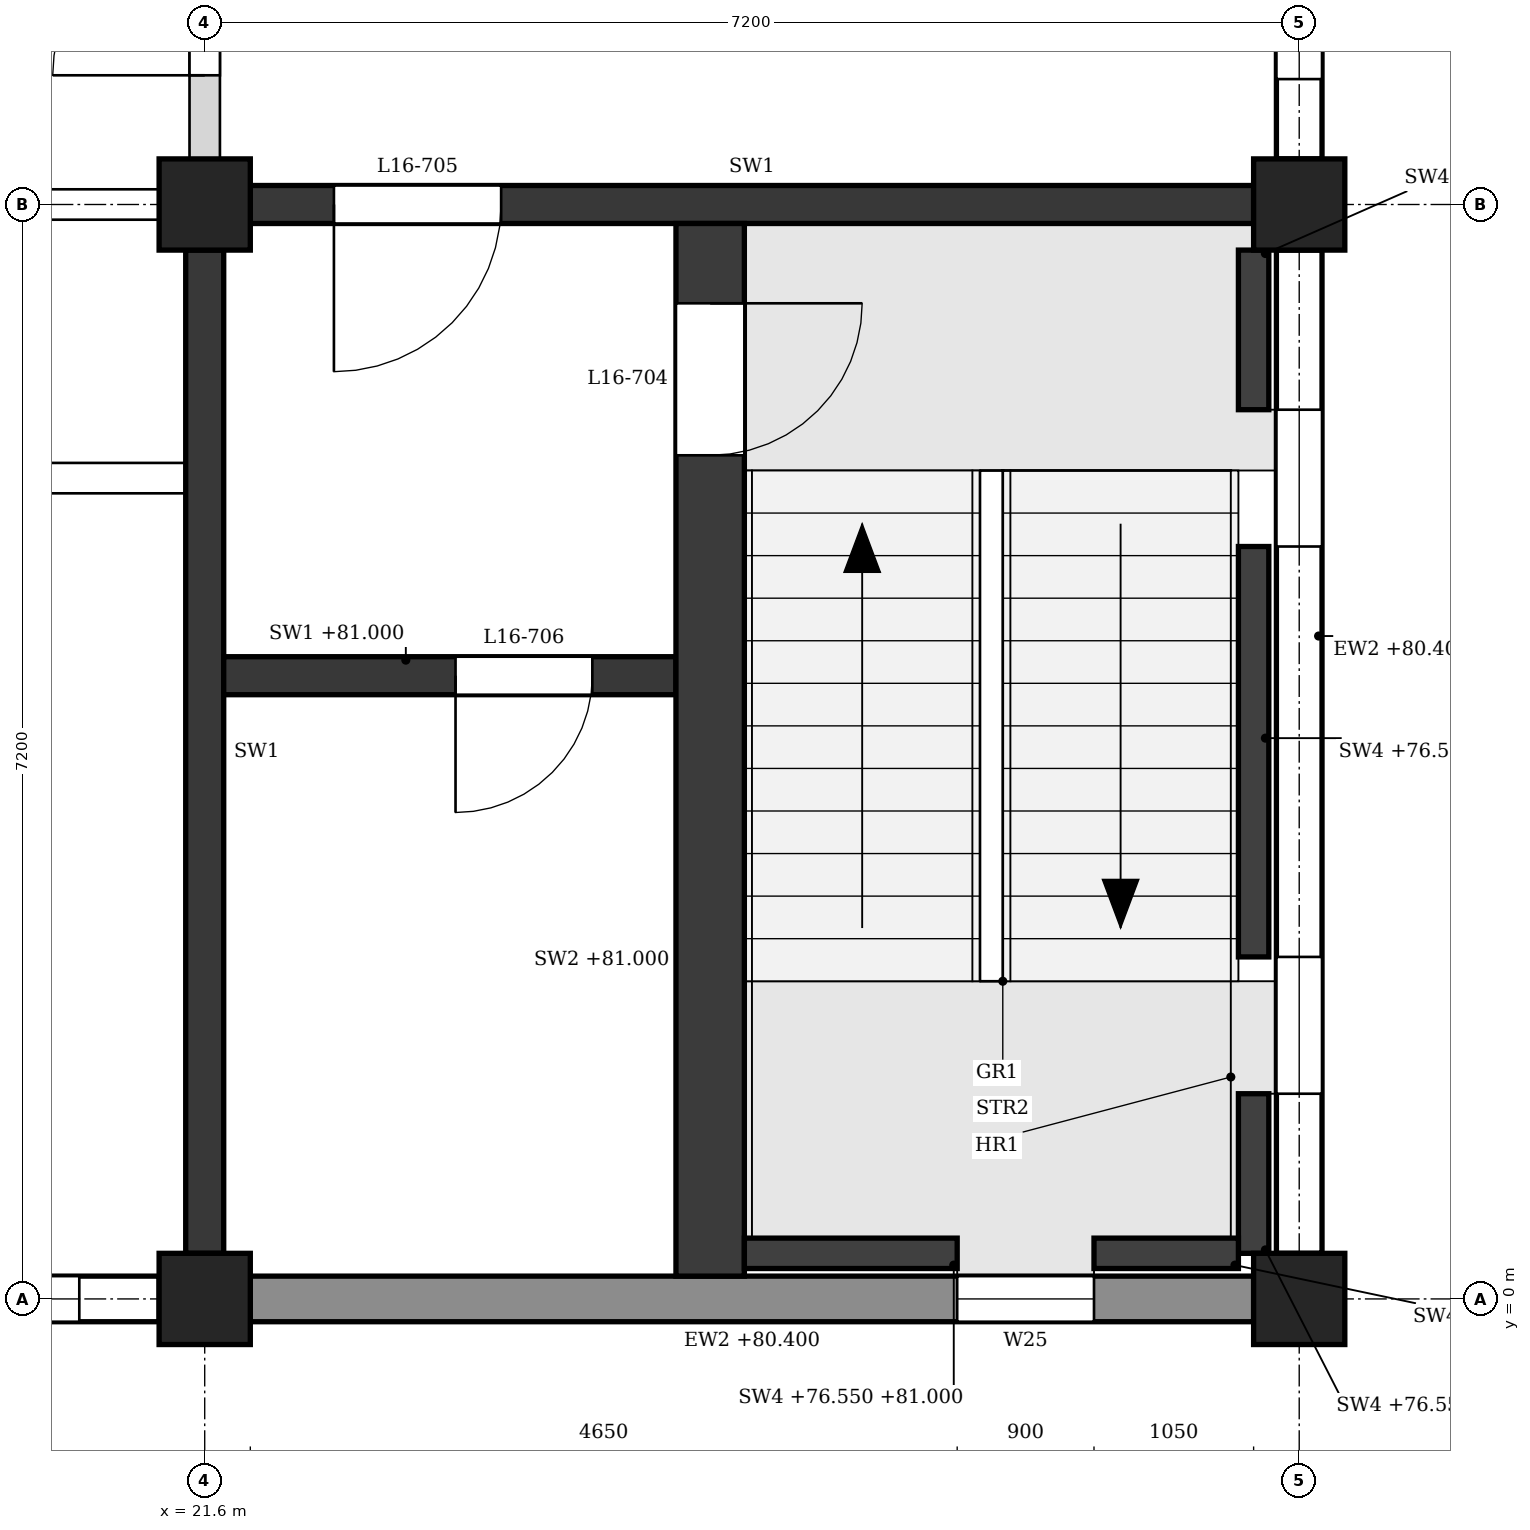
"""IFC4 building model, lengths in metres.
Left out: names, types, materials, properties, quantities, classifications, styles, units other than length and angle.
Written with IfcOpenShell. Run it as: python <this file> out.ifc"""

import sys

from ifc_helpers import new_model, si_unit, direction, frame, frame_2d, origin, origin_2d, place, context, subcontext, project, spatial, polyline, rectangle, outline, extrude, element, fill, save


model = new_model("IFC4")
c1 = context("Model", 3, precision=1e-05, world=origin(), true_north=direction((0.0, 1.0)))
c2 = subcontext(c1, "Body", "Model", "MODEL_VIEW")
j1 = project(units=[si_unit("LENGTHUNIT", "METRE"), si_unit("PLANEANGLEUNIT", "RADIAN")], contexts=[c1])
p1 = place(None, origin())
s1 = spatial("IfcSite", under=j1, at=p1, CompositionType="ELEMENT")
p2 = place(p1, origin())
s2 = spatial("IfcBuilding", under=s1, at=p2, CompositionType="ELEMENT")
p3 = place(p2, frame((0.0, 0.0, 76.8)))
s3 = spatial("IfcBuildingStorey", under=s2, at=p3, CompositionType="ELEMENT", Elevation=76.8)
for number, where, z_axis, x_axis in (
    (1, (21.6, 0.0, 0.0), (0.0, 0.0, 1.0), (1.0, 0.0, 0.0)),
    (2, (21.6, 7.2, 0.0), (0.0, 0.0, 1.0), (1.0, 0.0, 0.0)),
    (3, (28.8, 0.0, 0.0), (0.0, 0.0, 1.0), (1.0, 0.0, 0.0)),
    (4, (28.8, 7.2, 0.0), (0.0, 0.0, 1.0), (1.0, 0.0, 0.0)),
):
    element("IfcColumn", number, at=place(p3, frame(where, z_axis=z_axis, x_axis=x_axis)), inside=s3, PredefinedType="COLUMN", context=c2, shape_type="SweptSolid", body=[
        extrude(rectangle(XDim=0.6, YDim=0.6, at=origin_2d()), origin(), (0.0, 0.0, 1.0), 4.5),
    ])
p4 = place(p3, frame((14.7, 0.0, 0.0), z_axis=(0.0, 0.0, 1.0), x_axis=(1.0, 0.0, 0.0)))
e5 = element("IfcWall", 5, at=p4, inside=s3, PredefinedType="STANDARD", context=c2, shape_type="SweptSolid", body=[
    extrude(rectangle(XDim=6.6, YDim=0.3, at=frame_2d((3.3, 0.0))), origin(), (0.0, 0.0, 1.0), 3.6),
])
p5 = place(p4, frame((0.525, 0.0, 0.9)))
e6 = element("IfcOpeningElement", 6, at=p5, cuts=e5, PredefinedType="OPENING", context=c2, shape_type="SweptSolid", body=[
    extrude(outline(polyline([(0.0, 0.0), (0.9, 0.0), (0.9, 2.15), (0.45, 2.6), (0.0, 2.15), (0.0, 0.0)])), frame((0.0, 0.16, 0.0), z_axis=(0.0, -1.0, 0.0), x_axis=(1.0, 0.0, 0.0)), (0.0, 0.0, 1.0), 0.32),
])
p6 = place(p4, frame((1.575, 0.0, 0.9)))
e7 = element("IfcOpeningElement", 7, at=p6, cuts=e5, PredefinedType="OPENING", context=c2, shape_type="SweptSolid", body=[
    extrude(outline(polyline([(0.0, 0.0), (0.9, 0.0), (0.9, 2.15), (0.45, 2.6), (0.0, 2.15), (0.0, 0.0)])), frame((0.0, 0.16, 0.0), z_axis=(0.0, -1.0, 0.0), x_axis=(1.0, 0.0, 0.0)), (0.0, 0.0, 1.0), 0.32),
])
p7 = place(p4, frame((4.125, 0.0, 0.9)))
e8 = element("IfcOpeningElement", 8, at=p7, cuts=e5, PredefinedType="OPENING", context=c2, shape_type="SweptSolid", body=[
    extrude(outline(polyline([(0.0, 0.0), (0.9, 0.0), (0.9, 2.15), (0.45, 2.6), (0.0, 2.15), (0.0, 0.0)])), frame((0.0, 0.16, 0.0), z_axis=(0.0, -1.0, 0.0), x_axis=(1.0, 0.0, 0.0)), (0.0, 0.0, 1.0), 0.32),
])
p8 = place(p4, frame((5.175, 0.0, 0.9)))
e9 = element("IfcOpeningElement", 9, at=p8, cuts=e5, PredefinedType="OPENING", context=c2, shape_type="SweptSolid", body=[
    extrude(outline(polyline([(0.0, 0.0), (0.9, 0.0), (0.9, 2.15), (0.45, 2.6), (0.0, 2.15), (0.0, 0.0)])), frame((0.0, 0.16, 0.0), z_axis=(0.0, -1.0, 0.0), x_axis=(1.0, 0.0, 0.0)), (0.0, 0.0, 1.0), 0.32),
])
p9 = place(p3, frame((21.9, 0.0, 0.0), z_axis=(0.0, 0.0, 1.0), x_axis=(1.0, 0.0, 0.0)))
e10 = element("IfcWall", 10, at=p9, inside=s3, PredefinedType="STANDARD", context=c2, shape_type="SweptSolid", body=[
    extrude(rectangle(XDim=6.6, YDim=0.3, at=frame_2d((3.3, 0.0))), origin(), (0.0, 0.0, 1.0), 3.6),
])
p10 = place(p9, frame((4.65, 0.0, 0.9)))
e11 = element("IfcOpeningElement", 11, at=p10, cuts=e10, PredefinedType="OPENING", context=c2, shape_type="SweptSolid", body=[
    extrude(outline(polyline([(0.0, 0.0), (0.9, 0.0), (0.9, 2.15), (0.45, 2.6), (0.0, 2.15), (0.0, 0.0)])), frame((0.0, 0.16, 0.0), z_axis=(0.0, -1.0, 0.0), x_axis=(1.0, 0.0, 0.0)), (0.0, 0.0, 1.0), 0.32),
])
p11 = place(p3, frame((28.8, 0.3, 0.0), z_axis=(0.0, 0.0, 1.0), x_axis=(0.0, 1.0, 0.0)))
e12 = element("IfcWall", 12, at=p11, inside=s3, PredefinedType="STANDARD", context=c2, shape_type="SweptSolid", body=[
    extrude(rectangle(XDim=6.6, YDim=0.3, at=frame_2d((3.3, 0.0))), origin(), (0.0, 0.0, 1.0), 3.6),
])
p12 = place(p11, frame((1.05, 0.0, 0.9)))
e13 = element("IfcOpeningElement", 13, at=p12, cuts=e12, PredefinedType="OPENING", context=c2, shape_type="SweptSolid", body=[
    extrude(outline(polyline([(0.0, 0.0), (0.9, 0.0), (0.9, 2.15), (0.45, 2.6), (0.0, 2.15), (0.0, 0.0)])), frame((0.0, 0.16, 0.0), z_axis=(0.0, -1.0, 0.0), x_axis=(1.0, 0.0, 0.0)), (0.0, 0.0, 1.0), 0.32),
])
p13 = place(p11, frame((4.65, 0.0, 0.9)))
e14 = element("IfcOpeningElement", 14, at=p13, cuts=e12, PredefinedType="OPENING", context=c2, shape_type="SweptSolid", body=[
    extrude(outline(polyline([(0.0, 0.0), (0.9, 0.0), (0.9, 2.15), (0.45, 2.6), (0.0, 2.15), (0.0, 0.0)])), frame((0.0, 0.16, 0.0), z_axis=(0.0, -1.0, 0.0), x_axis=(1.0, 0.0, 0.0)), (0.0, 0.0, 1.0), 0.32),
])
p14 = place(p3, frame((28.8, 7.5, 0.0), z_axis=(0.0, 0.0, 1.0), x_axis=(0.0, 1.0, 0.0)))
e15 = element("IfcWall", 15, at=p14, inside=s3, PredefinedType="STANDARD", context=c2, shape_type="SweptSolid", body=[
    extrude(rectangle(XDim=6.6, YDim=0.3, at=frame_2d((3.3, 0.0))), origin(), (0.0, 0.0, 1.0), 3.6),
])
p15 = place(p14, frame((0.525, 0.0, 0.9)))
e16 = element("IfcOpeningElement", 16, at=p15, cuts=e15, PredefinedType="OPENING", context=c2, shape_type="SweptSolid", body=[
    extrude(outline(polyline([(0.0, 0.0), (0.9, 0.0), (0.9, 2.15), (0.45, 2.6), (0.0, 2.15), (0.0, 0.0)])), frame((0.0, 0.16, 0.0), z_axis=(0.0, -1.0, 0.0), x_axis=(1.0, 0.0, 0.0)), (0.0, 0.0, 1.0), 0.32),
])
p16 = place(p14, frame((1.575, 0.0, 0.9)))
e17 = element("IfcOpeningElement", 17, at=p16, cuts=e15, PredefinedType="OPENING", context=c2, shape_type="SweptSolid", body=[
    extrude(outline(polyline([(0.0, 0.0), (0.9, 0.0), (0.9, 2.15), (0.45, 2.6), (0.0, 2.15), (0.0, 0.0)])), frame((0.0, 0.16, 0.0), z_axis=(0.0, -1.0, 0.0), x_axis=(1.0, 0.0, 0.0)), (0.0, 0.0, 1.0), 0.32),
])
p17 = place(p3, frame((21.9, 7.2, 0.0), z_axis=(0.0, 0.0, 1.0), x_axis=(1.0, 0.0, 0.0)))
e18 = element("IfcWall", 18, at=p17, inside=s3, PredefinedType="SHEAR", context=c2, shape_type="SweptSolid", body=[
    extrude(rectangle(XDim=6.6, YDim=0.25, at=frame_2d((3.3, 0.0))), origin(), (0.0, 0.0, 1.0), 3.55),
])
p18 = place(p17, frame((0.55, 0.0, 0.0)))
e19 = element("IfcOpeningElement", 19, at=p18, cuts=e18, PredefinedType="OPENING", context=c2, shape_type="SweptSolid", body=[
    extrude(rectangle(XDim=1.1, YDim=2.1, at=frame_2d((0.55, 1.05))), frame((0.0, 0.135, 0.0), z_axis=(0.0, -1.0, 0.0), x_axis=(1.0, 0.0, 0.0)), (0.0, 0.0, 1.0), 0.27),
])
p19 = place(p3, frame((21.6, 0.3, 0.0), z_axis=(0.0, 0.0, 1.0), x_axis=(0.0, 1.0, 0.0)))
e20 = element("IfcWall", 20, at=p19, inside=s3, PredefinedType="SHEAR", context=c2, shape_type="SweptSolid", body=[
    extrude(rectangle(XDim=6.6, YDim=0.25, at=frame_2d((3.3, 0.0))), origin(), (0.0, 0.0, 1.0), 3.55),
])
p20 = place(p3, frame((28.5, 0.3, -0.25), z_axis=(0.0, 0.0, 1.0), x_axis=(0.0, 1.0, 0.0)))
e21 = element("IfcWall", 21, at=p20, inside=s3, PredefinedType="SHEAR", context=c2, shape_type="SweptSolid", body=[
    extrude(rectangle(XDim=1.05, YDim=0.2, at=frame_2d((0.525, 0.0))), origin(), (0.0, 0.0, 1.0), 4.45),
])
p21 = place(p3, frame((28.5, 2.25, -0.25), z_axis=(0.0, 0.0, 1.0), x_axis=(0.0, 1.0, 0.0)))
e22 = element("IfcWall", 22, at=p21, inside=s3, PredefinedType="SHEAR", context=c2, shape_type="SweptSolid", body=[
    extrude(rectangle(XDim=2.7, YDim=0.2, at=frame_2d((1.35, 0.0))), origin(), (0.0, 0.0, 1.0), 4.45),
])
p22 = place(p3, frame((28.5, 5.85, -0.25), z_axis=(0.0, 0.0, 1.0), x_axis=(0.0, 1.0, 0.0)))
e23 = element("IfcWall", 23, at=p22, inside=s3, PredefinedType="SHEAR", context=c2, shape_type="SweptSolid", body=[
    extrude(rectangle(XDim=1.05, YDim=0.2, at=frame_2d((0.525, 0.0))), origin(), (0.0, 0.0, 1.0), 4.45),
])
p23 = place(p3, frame((25.15, 0.3, -0.25), z_axis=(0.0, 0.0, 1.0), x_axis=(1.0, 0.0, 0.0)))
e24 = element("IfcWall", 24, at=p23, inside=s3, PredefinedType="SHEAR", context=c2, shape_type="SweptSolid", body=[
    extrude(rectangle(XDim=1.4, YDim=0.2, at=frame_2d((0.7, 0.0))), origin(), (0.0, 0.0, 1.0), 4.45),
])
p24 = place(p3, frame((27.45, 0.3, -0.25), z_axis=(0.0, 0.0, 1.0), x_axis=(1.0, 0.0, 0.0)))
e25 = element("IfcWall", 25, at=p24, inside=s3, PredefinedType="SHEAR", context=c2, shape_type="SweptSolid", body=[
    extrude(rectangle(XDim=0.95, YDim=0.2, at=frame_2d((0.475, 0.0))), origin(), (0.0, 0.0, 1.0), 4.45),
])
p25 = place(p3, frame((24.925, 0.15, 0.0), z_axis=(0.0, 0.0, 1.0), x_axis=(0.0, 1.0, 0.0)))
e26 = element("IfcWall", 26, at=p25, inside=s3, PredefinedType="SHEAR", context=c2, shape_type="SweptSolid", body=[
    extrude(rectangle(XDim=6.925, YDim=0.45, at=frame_2d((3.462, 0.0))), origin(), (0.0, 0.0, 1.0), 4.2),
])
p26 = place(p25, frame((5.4, 0.0, 0.0)))
e27 = element("IfcOpeningElement", 27, at=p26, cuts=e26, PredefinedType="OPENING", context=c2, shape_type="SweptSolid", body=[
    extrude(rectangle(XDim=1.0, YDim=2.1, at=frame_2d((0.5, 1.05))), frame((0.0, 0.235, 0.0), z_axis=(0.0, -1.0, 0.0), x_axis=(1.0, 0.0, 0.0)), (0.0, 0.0, 1.0), 0.47),
])
p27 = place(p3, frame((21.725, 4.1, 0.0), z_axis=(0.0, 0.0, 1.0), x_axis=(1.0, 0.0, 0.0)))
e28 = element("IfcWall", 28, at=p27, inside=s3, PredefinedType="SHEAR", context=c2, shape_type="SweptSolid", body=[
    extrude(rectangle(XDim=2.975, YDim=0.25, at=frame_2d((1.487, 0.0))), origin(), (0.0, 0.0, 1.0), 4.2),
])
p28 = place(p27, frame((1.525, 0.0, 0.0)))
e29 = element("IfcOpeningElement", 29, at=p28, cuts=e28, PredefinedType="OPENING", context=c2, shape_type="SweptSolid", body=[
    extrude(rectangle(XDim=0.9, YDim=2.1, at=frame_2d((0.45, 1.05))), frame((0.0, 0.135, 0.0), z_axis=(0.0, -1.0, 0.0), x_axis=(1.0, 0.0, 0.0)), (0.0, 0.0, 1.0), 0.27),
])
p29 = place(p3, frame((7.325, 5.4, 0.0), z_axis=(0.0, 0.0, 1.0), x_axis=(1.0, 0.0, 0.0)))
e30 = element("IfcWall", 30, at=p29, inside=s3, PredefinedType="PARTITIONING", context=c2, shape_type="SweptSolid", body=[
    extrude(outline(polyline([(0.0, 0.0), (14.15, 0.0), (14.15, 3.55), (14.05, 3.55), (14.05, 4.2), (7.3, 4.2), (7.3, 3.55), (6.85, 3.55), (6.85, 4.2), (0.1, 4.2), (0.1, 3.55), (0.0, 3.55), (0.0, 0.0)])), frame((0.0, 0.1, 0.0), z_axis=(0.0, -1.0, 0.0), x_axis=(1.0, 0.0, 0.0)), (0.0, 0.0, 1.0), 0.2),
])
p30 = place(p29, frame((1.238, 0.0, 0.0)))
e31 = element("IfcOpeningElement", 31, at=p30, cuts=e30, PredefinedType="OPENING", context=c2, shape_type="SweptSolid", body=[
    extrude(rectangle(XDim=1.0, YDim=2.1, at=frame_2d((0.5, 1.05))), frame((0.0, 0.11, 0.0), z_axis=(0.0, -1.0, 0.0), x_axis=(1.0, 0.0, 0.0)), (0.0, 0.0, 1.0), 0.22),
])
p31 = place(p29, frame((4.775, 0.0, 0.0)))
e32 = element("IfcOpeningElement", 32, at=p31, cuts=e30, PredefinedType="OPENING", context=c2, shape_type="SweptSolid", body=[
    extrude(rectangle(XDim=1.0, YDim=2.1, at=frame_2d((0.5, 1.05))), frame((0.0, 0.11, 0.0), z_axis=(0.0, -1.0, 0.0), x_axis=(1.0, 0.0, 0.0)), (0.0, 0.0, 1.0), 0.22),
])
p32 = place(p29, frame((8.375, 0.0, 0.0)))
e33 = element("IfcOpeningElement", 33, at=p32, cuts=e30, PredefinedType="OPENING", context=c2, shape_type="SweptSolid", body=[
    extrude(rectangle(XDim=1.0, YDim=2.1, at=frame_2d((0.5, 1.05))), frame((0.0, 0.11, 0.0), z_axis=(0.0, -1.0, 0.0), x_axis=(1.0, 0.0, 0.0)), (0.0, 0.0, 1.0), 0.22),
])
p33 = place(p29, frame((11.913, 0.0, 0.0)))
e34 = element("IfcOpeningElement", 34, at=p33, cuts=e30, PredefinedType="OPENING", context=c2, shape_type="SweptSolid", body=[
    extrude(rectangle(XDim=1.0, YDim=2.1, at=frame_2d((0.5, 1.05))), frame((0.0, 0.11, 0.0), z_axis=(0.0, -1.0, 0.0), x_axis=(1.0, 0.0, 0.0)), (0.0, 0.0, 1.0), 0.22),
])
p34 = place(p3, frame((14.7, 7.2, 0.0), z_axis=(0.0, 0.0, 1.0), x_axis=(1.0, 0.0, 0.0)))
e35 = element("IfcWall", 35, at=p34, inside=s3, PredefinedType="PARTITIONING", context=c2, shape_type="SweptSolid", body=[
    extrude(rectangle(XDim=6.6, YDim=0.2, at=frame_2d((3.3, 0.0))), origin(), (0.0, 0.0, 1.0), 3.55),
])
p35 = place(p34, frame((4.45, 0.0, 0.0)))
e36 = element("IfcOpeningElement", 36, at=p35, cuts=e35, PredefinedType="OPENING", context=c2, shape_type="SweptSolid", body=[
    extrude(rectangle(XDim=1.0, YDim=2.1, at=frame_2d((0.5, 1.05))), frame((0.0, 0.11, 0.0), z_axis=(0.0, -1.0, 0.0), x_axis=(1.0, 0.0, 0.0)), (0.0, 0.0, 1.0), 0.22),
])
p36 = place(p3, frame((21.6, 7.5, 0.0), z_axis=(0.0, 0.0, 1.0), x_axis=(0.0, 1.0, 0.0)))
e37 = element("IfcWall", 37, at=p36, inside=s3, PredefinedType="PARTITIONING", context=c2, shape_type="SweptSolid", body=[
    extrude(rectangle(XDim=2.825, YDim=0.2, at=frame_2d((1.413, 0.0))), origin(), (0.0, 0.0, 1.0), 3.55),
])
p37 = place(p36, frame((0.55, 0.0, 0.0)))
e38 = element("IfcOpeningElement", 38, at=p37, cuts=e37, PredefinedType="OPENING", context=c2, shape_type="SweptSolid", body=[
    extrude(rectangle(XDim=1.0, YDim=2.1, at=frame_2d((0.5, 1.05))), frame((0.0, 0.11, 0.0), z_axis=(0.0, -1.0, 0.0), x_axis=(1.0, 0.0, 0.0)), (0.0, 0.0, 1.0), 0.22),
])
p38 = place(p12, origin())
e39 = element("IfcWindow", 39, at=p38, inside=s3, PartitioningType="SINGLE_PANEL", PredefinedType="WINDOW", context=c2, shape_type="SweptSolid", body=[
    extrude(outline(polyline([(0.0, 0.0), (0.9, 0.0), (0.9, 2.15), (0.45, 2.6), (0.0, 2.15), (0.0, 0.0)])), frame((0.0, 0.03, 0.0), z_axis=(0.0, -1.0, 0.0), x_axis=(1.0, 0.0, 0.0)), (0.0, 0.0, 1.0), 0.06),
])
fill(e13, e39)
p39 = place(p13, origin())
e40 = element("IfcWindow", 40, at=p39, inside=s3, PartitioningType="SINGLE_PANEL", PredefinedType="WINDOW", context=c2, shape_type="SweptSolid", body=[
    extrude(outline(polyline([(0.0, 0.0), (0.9, 0.0), (0.9, 2.15), (0.45, 2.6), (0.0, 2.15), (0.0, 0.0)])), frame((0.0, 0.03, 0.0), z_axis=(0.0, -1.0, 0.0), x_axis=(1.0, 0.0, 0.0)), (0.0, 0.0, 1.0), 0.06),
])
fill(e14, e40)
p40 = place(p15, origin())
e41 = element("IfcWindow", 41, at=p40, inside=s3, PartitioningType="SINGLE_PANEL", PredefinedType="WINDOW", context=c2, shape_type="SweptSolid", body=[
    extrude(outline(polyline([(0.0, 0.0), (0.9, 0.0), (0.9, 2.15), (0.45, 2.6), (0.0, 2.15), (0.0, 0.0)])), frame((0.0, 0.03, 0.0), z_axis=(0.0, -1.0, 0.0), x_axis=(1.0, 0.0, 0.0)), (0.0, 0.0, 1.0), 0.06),
])
fill(e16, e41)
p41 = place(p8, origin())
e42 = element("IfcWindow", 42, at=p41, inside=s3, PartitioningType="SINGLE_PANEL", PredefinedType="WINDOW", context=c2, shape_type="SweptSolid", body=[
    extrude(outline(polyline([(0.0, 0.0), (0.9, 0.0), (0.9, 2.15), (0.45, 2.6), (0.0, 2.15), (0.0, 0.0)])), frame((0.0, 0.03, 0.0), z_axis=(0.0, -1.0, 0.0), x_axis=(1.0, 0.0, 0.0)), (0.0, 0.0, 1.0), 0.06),
])
fill(e9, e42)
p42 = place(p10, origin())
e43 = element("IfcWindow", 43, at=p42, inside=s3, PartitioningType="SINGLE_PANEL", PredefinedType="WINDOW", context=c2, shape_type="SweptSolid", body=[
    extrude(outline(polyline([(0.0, 0.0), (0.9, 0.0), (0.9, 2.15), (0.45, 2.6), (0.0, 2.15), (0.0, 0.0)])), frame((0.0, 0.03, 0.0), z_axis=(0.0, -1.0, 0.0), x_axis=(1.0, 0.0, 0.0)), (0.0, 0.0, 1.0), 0.06),
])
fill(e11, e43)
p43 = place(p26, frame((1.0, 0.0, 0.0), z_axis=(0.0, 0.0, 1.0), x_axis=(-1.0, 0.0, 0.0)))
e44 = element("IfcDoor", 44, at=p43, inside=s3, OperationType="SINGLE_SWING_LEFT", PredefinedType="DOOR", context=c2, shape_type="SweptSolid", body=[
    extrude(rectangle(XDim=1.0, YDim=2.1, at=frame_2d((0.5, 1.05))), frame((0.0, 0.025, 0.0), z_axis=(0.0, -1.0, 0.0), x_axis=(1.0, 0.0, 0.0)), (0.0, 0.0, 1.0), 0.05),
])
fill(e27, e44)
p44 = place(p18, frame((1.1, 0.0, 0.0), z_axis=(0.0, 0.0, 1.0), x_axis=(-1.0, 0.0, 0.0)))
e45 = element("IfcDoor", 45, at=p44, inside=s3, OperationType="SINGLE_SWING_RIGHT", PredefinedType="DOOR", context=c2, shape_type="SweptSolid", body=[
    extrude(rectangle(XDim=1.1, YDim=2.1, at=frame_2d((0.55, 1.05))), frame((0.0, 0.025, 0.0), z_axis=(0.0, -1.0, 0.0), x_axis=(1.0, 0.0, 0.0)), (0.0, 0.0, 1.0), 0.05),
])
fill(e19, e45)
p45 = place(p28, frame((0.9, 0.0, 0.0), z_axis=(0.0, 0.0, 1.0), x_axis=(-1.0, 0.0, 0.0)))
e46 = element("IfcDoor", 46, at=p45, inside=s3, OperationType="SINGLE_SWING_RIGHT", PredefinedType="DOOR", context=c2, shape_type="SweptSolid", body=[
    extrude(rectangle(XDim=0.9, YDim=2.1, at=frame_2d((0.45, 1.05))), frame((0.0, 0.025, 0.0), z_axis=(0.0, -1.0, 0.0), x_axis=(1.0, 0.0, 0.0)), (0.0, 0.0, 1.0), 0.05),
])
fill(e29, e46)
p46 = place(p37, origin())
e47 = element("IfcDoor", 47, at=p46, inside=s3, OperationType="SINGLE_SWING_LEFT", PredefinedType="DOOR", context=c2, shape_type="SweptSolid", body=[
    extrude(rectangle(XDim=1.0, YDim=2.1, at=frame_2d((0.5, 1.05))), frame((0.0, 0.025, 0.0), z_axis=(0.0, -1.0, 0.0), x_axis=(1.0, 0.0, 0.0)), (0.0, 0.0, 1.0), 0.05),
])
fill(e38, e47)
save(model, sys.argv[1])
